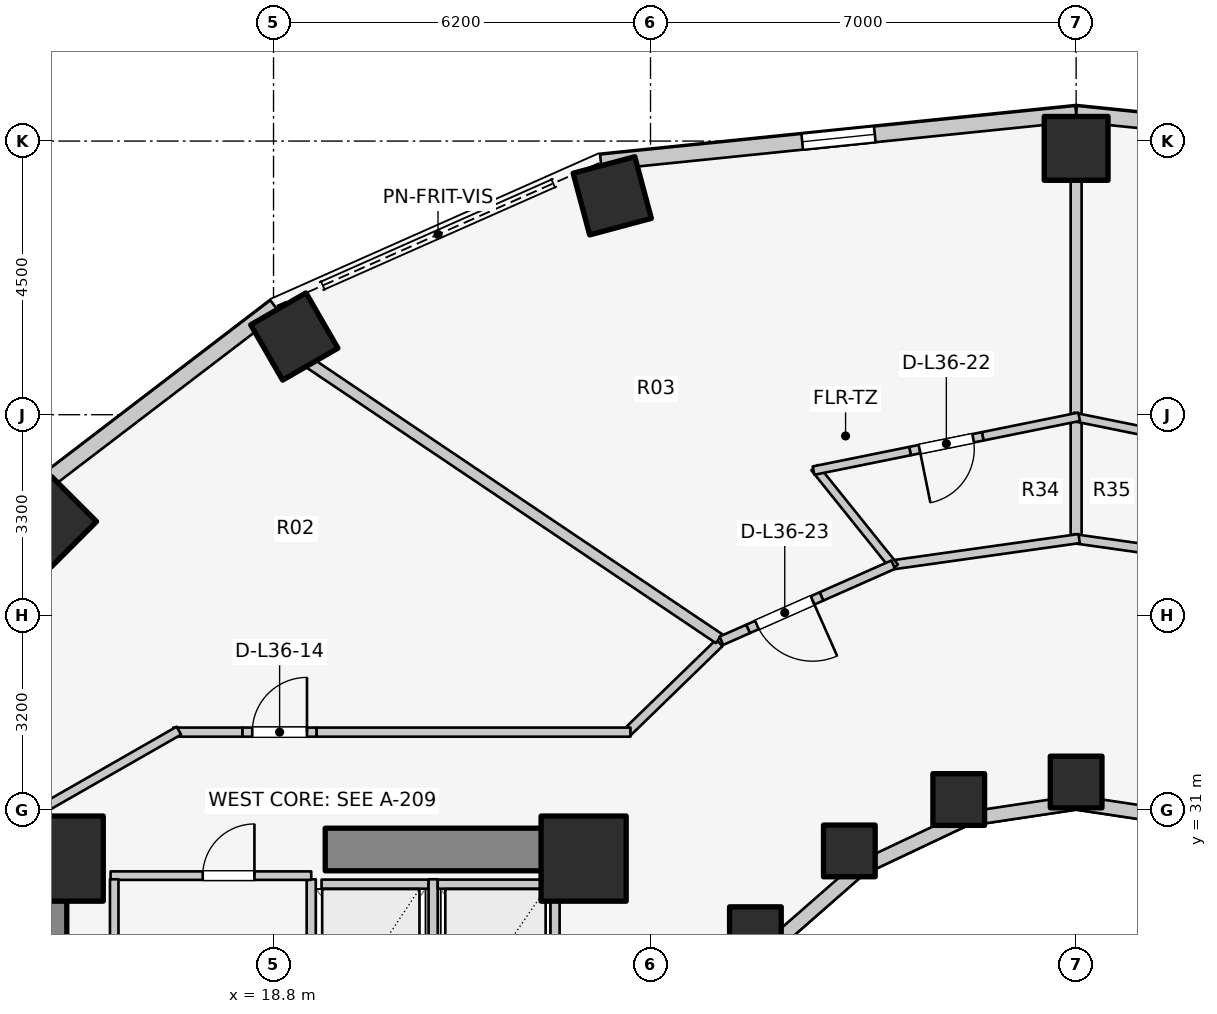
"""IFC4 building model, lengths in metres.
Left out: names, types, materials, properties, quantities, classifications, styles, units other than length and angle.
Written with IfcOpenShell. Run it as: python <this file> out.ifc"""

import sys

from ifc_helpers import new_model, si_unit, direction, frame, frame_2d, origin, origin_2d, place, context, subcontext, project, spatial, rectangle, extrude, element, fill, save


model = new_model("IFC4")
c1 = context("Model", 3, precision=1e-05, world=origin(), true_north=direction((0.0, 1.0)))
c2 = subcontext(c1, "Body", "Model", "MODEL_VIEW")
j1 = project(units=[si_unit("LENGTHUNIT", "METRE"), si_unit("PLANEANGLEUNIT", "RADIAN")], contexts=[c1])
p1 = place(None, origin())
s1 = spatial("IfcSite", under=j1, at=p1, CompositionType="ELEMENT")
p2 = place(p1, origin())
s2 = spatial("IfcBuilding", under=s1, at=p2, CompositionType="ELEMENT")
p3 = place(p2, frame((0.0, 0.0, 119.7)))
s3 = spatial("IfcBuildingStorey", under=s2, at=p3, CompositionType="ELEMENT", Elevation=119.7)
p4 = place(p3, frame((15.05, 17.05, 0.0), z_axis=(0.0, 0.0, 1.0), x_axis=(0.0, 1.0, 0.0)))
e1 = element("IfcWall", 1, at=p4, inside=s3, PredefinedType="SHEAR", context=c2, shape_type="SweptSolid", body=[
    extrude(rectangle(XDim=12.8, YDim=0.7, at=frame_2d((6.4, 0.0))), origin(), (0.0, 0.0, 1.0), 3.1),
])
p5 = place(p3, frame((19.65, 30.35, 0.0), z_axis=(0.0, 0.0, 1.0), x_axis=(1.0, 0.0, 0.0)))
e2 = element("IfcWall", 2, at=p5, inside=s3, PredefinedType="SHEAR", context=c2, shape_type="SweptSolid", body=[
    extrude(rectangle(XDim=4.5, YDim=0.7, at=frame_2d((2.25, 0.0))), origin(), (0.0, 0.0, 1.0), 3.1),
])
for number, where, z_axis, x_axis in (
    (3, (23.9, 30.2, 0.0), (0.0, 0.0, 1.0), (1.0, 0.0, 0.0)),
    (4, (15.3, 30.2, 0.0), (0.0, 0.0, 1.0), (1.0, 0.0, 0.0)),
):
    element("IfcColumn", number, at=place(p3, frame(where, z_axis=z_axis, x_axis=x_axis)), inside=s3, PredefinedType="COLUMN", context=c2, shape_type="SweptSolid", body=[
        extrude(rectangle(XDim=1.4, YDim=1.4, at=origin_2d()), origin(), (0.0, 0.0, 1.0), 3.1),
    ])
p6 = place(p3, frame((32.0, 31.46, 0.0), z_axis=(0.0, 0.0, 1.0), x_axis=(1.0, 0.0, 0.0)))
e5 = element("IfcColumn", 5, at=p6, inside=s3, PredefinedType="COLUMN", context=c2, shape_type="SweptSolid", body=[
    extrude(rectangle(XDim=0.85, YDim=0.85, at=origin_2d()), origin(), (0.0, 0.0, 1.0), 3.1),
])
p7 = place(p3, frame((32.0, 41.88, 0.0), z_axis=(0.0, 0.0, 1.0), x_axis=(0.0, 1.0, 0.0)))
e6 = element("IfcColumn", 6, at=p7, inside=s3, PredefinedType="COLUMN", context=c2, shape_type="SweptSolid", body=[
    extrude(rectangle(XDim=1.05, YDim=1.05, at=origin_2d()), origin(), (0.0, 0.0, 1.0), 3.1),
])
p8 = place(p3, frame((30.069, 31.172, 0.0), z_axis=(0.0, 0.0, 1.0), x_axis=(1.0, 0.0, 0.0)))
e7 = element("IfcColumn", 7, at=p8, inside=s3, PredefinedType="COLUMN", context=c2, shape_type="SweptSolid", body=[
    extrude(rectangle(XDim=0.85, YDim=0.85, at=origin_2d()), origin(), (0.0, 0.0, 1.0), 3.1),
])
p9 = place(p3, frame((24.371, 41.1, 0.0), z_axis=(0.0, 0.0, 1.0), x_axis=(-0.258819045103, 0.965925826289, 0.0)))
e8 = element("IfcColumn", 8, at=p9, inside=s3, PredefinedType="COLUMN", context=c2, shape_type="SweptSolid", body=[
    extrude(rectangle(XDim=1.05, YDim=1.05, at=origin_2d()), origin(), (0.0, 0.0, 1.0), 3.1),
])
p10 = place(p3, frame((28.27, 30.327, 0.0), z_axis=(0.0, 0.0, 1.0), x_axis=(1.0, 0.0, 0.0)))
e9 = element("IfcColumn", 9, at=p10, inside=s3, PredefinedType="COLUMN", context=c2, shape_type="SweptSolid", body=[
    extrude(rectangle(XDim=0.85, YDim=0.85, at=origin_2d()), origin(), (0.0, 0.0, 1.0), 3.1),
])
p11 = place(p3, frame((19.142, 38.786, 0.0), z_axis=(0.0, 0.0, 1.0), x_axis=(-0.5, 0.866025403784, 0.0)))
e10 = element("IfcColumn", 10, at=p11, inside=s3, PredefinedType="COLUMN", context=c2, shape_type="SweptSolid", body=[
    extrude(rectangle(XDim=1.05, YDim=1.05, at=origin_2d()), origin(), (0.0, 0.0, 1.0), 3.1),
])
p12 = place(p3, frame((26.725, 28.982, 0.0), z_axis=(0.0, 0.0, 1.0), x_axis=(1.0, 0.0, 0.0)))
e11 = element("IfcColumn", 11, at=p12, inside=s3, PredefinedType="COLUMN", context=c2, shape_type="SweptSolid", body=[
    extrude(rectangle(XDim=0.85, YDim=0.85, at=origin_2d()), origin(), (0.0, 0.0, 1.0), 3.1),
])
p13 = place(p3, frame((15.147, 35.743, 0.0), z_axis=(0.0, 0.0, 1.0), x_axis=(-0.707106781187, 0.707106781187, 0.0)))
e12 = element("IfcColumn", 12, at=p13, inside=s3, PredefinedType="COLUMN", context=c2, shape_type="SweptSolid", body=[
    extrude(rectangle(XDim=1.05, YDim=1.05, at=origin_2d()), origin(), (0.0, 0.0, 1.0), 3.1),
])
for number, where, z_axis, x_axis in (
    (13, (33.843, 30.843, 0.0), (0.0, 0.0, 1.0), (-0.989, 0.149, 0.0)),
    (14, (32.0, 31.12, 0.0), (0.0, 0.0, 1.0), (-0.989, -0.149, 0.0)),
):
    element("IfcWall", number, at=place(p3, frame(where, z_axis=z_axis, x_axis=x_axis)), inside=s3, PredefinedType="STANDARD", context=c2, shape_type="SweptSolid", body=[
        extrude(rectangle(XDim=1.864, YDim=0.23, at=frame_2d((0.932, 0.0))), origin(), (0.0, 0.0, 1.0), 1.22),
    ])
p14 = place(p3, frame((30.157, 30.843, 0.0), z_axis=(0.0, 0.0, 1.0), x_axis=(-0.904179699603, -0.427152280606, 0.0)))
e15 = element("IfcWall", 15, at=p14, inside=s3, PredefinedType="STANDARD", context=c2, shape_type="SweptSolid", body=[
    extrude(rectangle(XDim=1.899, YDim=0.23, at=frame_2d((0.95, 0.0))), origin(), (0.0, 0.0, 1.0), 1.22),
])
p15 = place(p3, frame((28.44, 30.032, 0.0), z_axis=(0.0, 0.0, 1.0), x_axis=(-0.752576694707, -0.658504607869, 0.0)))
e16 = element("IfcWall", 16, at=p15, inside=s3, PredefinedType="STANDARD", context=c2, shape_type="SweptSolid", body=[
    extrude(rectangle(XDim=1.959, YDim=0.23, at=frame_2d((0.98, 0.0))), origin(), (0.0, 0.0, 1.0), 1.22),
])
p16 = place(p3, frame((39.816, 41.651, 0.0), z_axis=(0.0, 0.0, 1.0), x_axis=(-0.994821390558, 0.101638579726, 0.0)))
e17 = element("IfcWall", 17, at=p16, inside=s3, PredefinedType="STANDARD", context=c2, shape_type="SweptSolid", body=[
    extrude(rectangle(XDim=7.857, YDim=0.26, at=frame_2d((3.929, 0.0))), origin(), (0.0, 0.0, 1.0), 1.22),
])
p17 = place(p16, frame((3.329, 0.0, 0.15)))
e18 = element("IfcOpeningElement", 18, at=p17, cuts=e17, PredefinedType="OPENING", context=c2, shape_type="SweptSolid", body=[
    extrude(rectangle(XDim=1.2, YDim=0.9, at=frame_2d((0.6, 0.45))), frame((0.0, 0.14, 0.0), z_axis=(0.0, -1.0, 0.0), x_axis=(1.0, 0.0, 0.0)), (0.0, 0.0, 1.0), 0.28),
])
p18 = place(p3, frame((32.0, 42.449, 0.0), z_axis=(0.0, 0.0, 1.0), x_axis=(-0.994821390558, -0.101638579726, 0.0)))
e19 = element("IfcWall", 19, at=p18, inside=s3, PredefinedType="STANDARD", context=c2, shape_type="SweptSolid", body=[
    extrude(rectangle(XDim=7.857, YDim=0.26, at=frame_2d((3.929, 0.0))), origin(), (0.0, 0.0, 1.0), 1.22),
])
p19 = place(p18, frame((3.329, 0.0, 0.15)))
e20 = element("IfcOpeningElement", 20, at=p19, cuts=e19, PredefinedType="OPENING", context=c2, shape_type="SweptSolid", body=[
    extrude(rectangle(XDim=1.2, YDim=0.9, at=frame_2d((0.6, 0.45))), frame((0.0, 0.14, 0.0), z_axis=(0.0, -1.0, 0.0), x_axis=(1.0, 0.0, 0.0)), (0.0, 0.0, 1.0), 0.28),
])
p20 = place(p3, frame((18.827, 39.278, 0.0), z_axis=(0.0, 0.0, 1.0), x_axis=(-0.794809810864, -0.606858603427, 0.0)))
e21 = element("IfcWall", 21, at=p20, inside=s3, PredefinedType="STANDARD", context=c2, shape_type="SweptSolid", body=[
    extrude(rectangle(XDim=5.149, YDim=0.26, at=frame_2d((2.575, 0.0))), origin(), (0.0, 0.0, 1.0), 1.22),
])
p21 = place(p3, frame((19.59, 29.78, 0.0), z_axis=(0.0, 0.0, 1.0), x_axis=(1.0, 0.0, 0.0)))
e22 = element("IfcWall", 22, at=p21, inside=s3, PredefinedType="SOLIDWALL", context=c2, shape_type="SweptSolid", body=[
    extrude(rectangle(XDim=1.76, YDim=0.15, at=frame_2d((0.88, 0.0))), origin(), (0.0, 0.0, 1.0), 2.575),
])
for number, where, z_axis, x_axis in (
    (23, (19.42, 27.14, 0.0), (0.0, 0.0, 1.0), (0.0, 1.0, 0.0)),
    (24, (21.425, 27.14, 0.0), (0.0, 0.0, 1.0), (0.0, 1.0, 0.0)),
):
    element("IfcWall", number, at=place(p3, frame(where, z_axis=z_axis, x_axis=x_axis)), inside=s3, PredefinedType="SOLIDWALL", context=c2, shape_type="SweptSolid", body=[
        extrude(rectangle(XDim=2.72, YDim=0.15, at=frame_2d((1.36, 0.0))), origin(), (0.0, 0.0, 1.0), 2.575),
    ])
p22 = place(p3, frame((21.5, 29.78, 0.0), z_axis=(0.0, 0.0, 1.0), x_axis=(1.0, 0.0, 0.0)))
e25 = element("IfcWall", 25, at=p22, inside=s3, PredefinedType="SOLIDWALL", context=c2, shape_type="SweptSolid", body=[
    extrude(rectangle(XDim=1.76, YDim=0.15, at=frame_2d((0.88, 0.0))), origin(), (0.0, 0.0, 1.0), 2.575),
])
p23 = place(p3, frame((23.43, 27.14, 0.0), z_axis=(0.0, 0.0, 1.0), x_axis=(0.0, 1.0, 0.0)))
e26 = element("IfcWall", 26, at=p23, inside=s3, PredefinedType="SOLIDWALL", context=c2, shape_type="SweptSolid", body=[
    extrude(rectangle(XDim=2.72, YDim=0.15, at=frame_2d((1.36, 0.0))), origin(), (0.0, 0.0, 1.0), 2.575),
])
p24 = place(p3, frame((16.12, 29.92, 0.0), z_axis=(0.0, 0.0, 1.0), x_axis=(1.0, 0.0, 0.0)))
e27 = element("IfcWall", 27, at=p24, inside=s3, PredefinedType="PLUMBINGWALL", context=c2, shape_type="SweptSolid", body=[
    extrude(rectangle(XDim=3.3, YDim=0.14, at=frame_2d((1.65, 0.0))), origin(), (0.0, 0.0, 1.0), 2.575),
])
p25 = place(p24, frame((1.516, 0.0, 0.0)))
e28 = element("IfcOpeningElement", 28, at=p25, cuts=e27, PredefinedType="OPENING", context=c2, shape_type="SweptSolid", body=[
    extrude(rectangle(XDim=0.85, YDim=2.05, at=frame_2d((0.425, 1.025))), frame((0.0, 0.08, 0.0), z_axis=(0.0, -1.0, 0.0), x_axis=(1.0, 0.0, 0.0)), (0.0, 0.0, 1.0), 0.16),
])
p26 = place(p3, frame((16.18, 25.98, 0.0), z_axis=(0.0, 0.0, 1.0), x_axis=(0.0, 1.0, 0.0)))
e29 = element("IfcWall", 29, at=p26, inside=s3, PredefinedType="PLUMBINGWALL", context=c2, shape_type="SweptSolid", body=[
    extrude(rectangle(XDim=3.88, YDim=0.14, at=frame_2d((1.94, 0.0))), origin(), (0.0, 0.0, 1.0), 2.575),
])
p27 = place(p3, frame((26.133, 33.749, 0.0), z_axis=(0.0, 0.0, 1.0), x_axis=(-0.717419568599, -0.696641344302, 0.0)))
e30 = element("IfcWall", 30, at=p27, inside=s3, PredefinedType="PARTITIONING", context=c2, shape_type="SweptSolid", body=[
    extrude(rectangle(XDim=2.138, YDim=0.15, at=frame_2d((1.069, 0.0))), origin(), (0.0, 0.0, 1.0), 1.22),
])
p28 = place(p3, frame((17.15, 32.28, 0.0), z_axis=(0.0, 0.0, 1.0), x_axis=(1.0, 0.0, 0.0)))
e31 = element("IfcWall", 31, at=p28, inside=s3, PredefinedType="PARTITIONING", context=c2, shape_type="SweptSolid", body=[
    extrude(rectangle(XDim=1.14, YDim=0.15, at=frame_2d((0.57, 0.0))), origin(), (0.0, 0.0, 1.0), 2.575),
])
p29 = place(p3, frame((18.29, 32.28, 0.0), z_axis=(0.0, 0.0, 1.0), x_axis=(1.0, 0.0, 0.0)))
e32 = element("IfcWall", 32, at=p29, inside=s3, PredefinedType="PARTITIONING", context=c2, shape_type="SweptSolid", body=[
    extrude(rectangle(XDim=1.22, YDim=0.15, at=frame_2d((0.61, 0.0))), origin(), (0.0, 0.0, 1.0), 2.575),
])
p30 = place(p29, frame((0.16, 0.0, 0.0)))
e33 = element("IfcOpeningElement", 33, at=p30, cuts=e32, PredefinedType="OPENING", context=c2, shape_type="SweptSolid", body=[
    extrude(rectangle(XDim=0.9, YDim=2.1, at=frame_2d((0.45, 1.05))), frame((0.0, 0.085, 0.0), z_axis=(0.0, -1.0, 0.0), x_axis=(1.0, 0.0, 0.0)), (0.0, 0.0, 1.0), 0.17),
])
p31 = place(p3, frame((19.51, 32.28, 0.0), z_axis=(0.0, 0.0, 1.0), x_axis=(1.0, 0.0, 0.0)))
e34 = element("IfcWall", 34, at=p31, inside=s3, PredefinedType="PARTITIONING", context=c2, shape_type="SweptSolid", body=[
    extrude(rectangle(XDim=5.16, YDim=0.15, at=frame_2d((2.58, 0.0))), origin(), (0.0, 0.0, 1.0), 1.22),
])
p32 = place(p3, frame((17.243, 32.305, 0.0), z_axis=(0.0, 0.0, 1.0), x_axis=(-0.867991349648, -0.496579315857, 0.0)))
e35 = element("IfcWall", 35, at=p32, inside=s3, PredefinedType="PARTITIONING", context=c2, shape_type="SweptSolid", body=[
    extrude(rectangle(XDim=2.567, YDim=0.15, at=frame_2d((1.283, 0.0))), origin(), (0.0, 0.0, 1.0), 1.22),
])
p33 = place(p3, frame((32.0, 35.511, 0.0), z_axis=(0.0, 0.0, 1.0), x_axis=(0.0, 1.0, 0.0)))
e36 = element("IfcWall", 36, at=p33, inside=s3, PredefinedType="PARTITIONING", context=c2, shape_type="SweptSolid", body=[
    extrude(rectangle(XDim=5.864, YDim=0.18, at=frame_2d((2.932, 0.0))), origin(), (0.0, 0.0, 1.0), 1.22),
])
p34 = place(p3, frame((26.126, 33.818, 0.0), z_axis=(0.0, 0.0, 1.0), x_axis=(-0.829603023521, 0.558353672295, 0.0)))
e37 = element("IfcWall", 37, at=p34, inside=s3, PredefinedType="PARTITIONING", context=c2, shape_type="SweptSolid", body=[
    extrude(rectangle(XDim=8.115, YDim=0.18, at=frame_2d((4.058, 0.0))), origin(), (0.0, 0.0, 1.0), 1.22),
])
p35 = place(p3, frame((35.066, 35.025, 0.0), z_axis=(0.0, 0.0, 1.0), x_axis=(-0.990254405439, 0.139270285808, 0.0)))
e38 = element("IfcWall", 38, at=p35, inside=s3, PredefinedType="PARTITIONING", context=c2, shape_type="SweptSolid", body=[
    extrude(rectangle(XDim=3.147, YDim=0.15, at=frame_2d((1.573, 0.0))), origin(), (0.0, 0.0, 1.0), 1.22),
])
p36 = place(p3, frame((33.537, 37.145, 0.0), z_axis=(0.0, 0.0, 1.0), x_axis=(-0.980084252106, 0.198582120981, 0.0)))
e39 = element("IfcWall", 39, at=p36, inside=s3, PredefinedType="PLUMBINGWALL", context=c2, shape_type="SweptSolid", body=[
    extrude(rectangle(XDim=1.618, YDim=0.14, at=frame_2d((0.809, 0.0))), origin(), (0.0, 0.0, 1.0), 1.22),
])
p37 = place(p3, frame((32.05, 35.463, 0.0), z_axis=(0.0, 0.0, 1.0), x_axis=(-0.990254405439, -0.139270285808, 0.0)))
e40 = element("IfcWall", 40, at=p37, inside=s3, PredefinedType="PARTITIONING", context=c2, shape_type="SweptSolid", body=[
    extrude(rectangle(XDim=3.147, YDim=0.15, at=frame_2d((1.573, 0.0))), origin(), (0.0, 0.0, 1.0), 1.22),
])
p38 = place(p3, frame((29.014, 34.993, 0.0), z_axis=(0.0, 0.0, 1.0), x_axis=(-0.626196812755, 0.779665025313, 0.0)))
e41 = element("IfcWall", 41, at=p38, inside=s3, PredefinedType="PLUMBINGWALL", context=c2, shape_type="SweptSolid", body=[
    extrude(rectangle(XDim=2.1, YDim=0.14, at=frame_2d((1.05, 0.0))), origin(), (0.0, 0.0, 1.0), 2.105),
])
p39 = place(p3, frame((32.049, 37.466, 0.0), z_axis=(0.0, 0.0, 1.0), x_axis=(-0.980090201438, -0.198552756326, 0.0)))
e42 = element("IfcWall", 42, at=p39, inside=s3, PredefinedType="PLUMBINGWALL", context=c2, shape_type="SweptSolid", body=[
    extrude(rectangle(XDim=1.618, YDim=0.14, at=frame_2d((0.809, 0.0))), origin(), (0.0, 0.0, 1.0), 1.22),
])
p40 = place(p3, frame((30.463, 37.145, 0.0), z_axis=(0.0, 0.0, 1.0), x_axis=(-0.980092719514, -0.198540326273, 0.0)))
e43 = element("IfcWall", 43, at=p40, inside=s3, PredefinedType="PLUMBINGWALL", context=c2, shape_type="SweptSolid", body=[
    extrude(rectangle(XDim=1.22, YDim=0.14, at=frame_2d((0.61, 0.0))), origin(), (0.0, 0.0, 1.0), 2.575),
])
p41 = place(p40, frame((0.16, 0.0, 0.0)))
e44 = element("IfcOpeningElement", 44, at=p41, cuts=e43, PredefinedType="OPENING", context=c2, shape_type="SweptSolid", body=[
    extrude(rectangle(XDim=0.9, YDim=2.1, at=frame_2d((0.45, 1.05))), frame((0.0, 0.08, 0.0), z_axis=(0.0, -1.0, 0.0), x_axis=(1.0, 0.0, 0.0)), (0.0, 0.0, 1.0), 0.16),
])
p42 = place(p3, frame((29.268, 36.902, 0.0), z_axis=(0.0, 0.0, 1.0), x_axis=(-0.980084252106, -0.198582120981, 0.0)))
e45 = element("IfcWall", 45, at=p42, inside=s3, PredefinedType="PLUMBINGWALL", context=c2, shape_type="SweptSolid", body=[
    extrude(rectangle(XDim=1.618, YDim=0.14, at=frame_2d((0.809, 0.0))), origin(), (0.0, 0.0, 1.0), 2.575),
])
p43 = place(p3, frame((28.991, 35.034, 0.0), z_axis=(0.0, 0.0, 1.0), x_axis=(-0.914512451665, -0.404557753292, 0.0)))
e46 = element("IfcWall", 46, at=p43, inside=s3, PredefinedType="PARTITIONING", context=c2, shape_type="SweptSolid", body=[
    extrude(rectangle(XDim=1.29, YDim=0.15, at=frame_2d((0.645, 0.0))), origin(), (0.0, 0.0, 1.0), 1.22),
])
p44 = place(p3, frame((27.811, 34.512, 0.0), z_axis=(0.0, 0.0, 1.0), x_axis=(-0.914352324799, -0.404919530444, 0.0)))
e47 = element("IfcWall", 47, at=p44, inside=s3, PredefinedType="PARTITIONING", context=c2, shape_type="SweptSolid", body=[
    extrude(rectangle(XDim=1.32, YDim=0.15, at=frame_2d((0.66, 0.0))), origin(), (0.0, 0.0, 1.0), 2.16),
])
p45 = place(p44, frame((0.16, 0.0, 0.0)))
e48 = element("IfcOpeningElement", 48, at=p45, cuts=e47, PredefinedType="OPENING", context=c2, shape_type="SweptSolid", body=[
    extrude(rectangle(XDim=1.0, YDim=2.1, at=frame_2d((0.5, 1.05))), frame((0.0, 0.085, 0.0), z_axis=(0.0, -1.0, 0.0), x_axis=(1.0, 0.0, 0.0)), (0.0, 0.0, 1.0), 0.17),
])
p46 = place(p3, frame((26.604, 33.977, 0.0), z_axis=(0.0, 0.0, 1.0), x_axis=(-0.914564252461, -0.404440636088, 0.0)))
e49 = element("IfcWall", 49, at=p46, inside=s3, PredefinedType="PARTITIONING", context=c2, shape_type="SweptSolid", body=[
    extrude(rectangle(XDim=0.48, YDim=0.15, at=frame_2d((0.24, 0.0))), origin(), (0.0, 0.0, 1.0), 2.575),
])
p47 = place(p19, origin())
e50 = element("IfcWindow", 50, at=p47, inside=s3, PartitioningType="SINGLE_PANEL", PredefinedType="WINDOW", context=c2, shape_type="SweptSolid", body=[
    extrude(rectangle(XDim=1.2, YDim=0.9, at=frame_2d((0.6, 0.45))), frame((0.0, 0.03, 0.0), z_axis=(0.0, -1.0, 0.0), x_axis=(1.0, 0.0, 0.0)), (0.0, 0.0, 1.0), 0.06),
])
fill(e20, e50)
p48 = place(p25, origin())
e51 = element("IfcDoor", 51, at=p48, inside=s3, OperationType="SINGLE_SWING_RIGHT", PredefinedType="DOOR", context=c2, shape_type="SweptSolid", body=[
    extrude(rectangle(XDim=0.85, YDim=2.05, at=frame_2d((0.425, 1.025))), frame((0.0, 0.025, 0.0), z_axis=(0.0, -1.0, 0.0), x_axis=(1.0, 0.0, 0.0)), (0.0, 0.0, 1.0), 0.05),
])
fill(e28, e51)
p49 = place(p30, origin())
e52 = element("IfcDoor", 52, at=p49, inside=s3, OperationType="SINGLE_SWING_RIGHT", PredefinedType="DOOR", context=c2, shape_type="SweptSolid", body=[
    extrude(rectangle(XDim=0.9, YDim=2.1, at=frame_2d((0.45, 1.05))), frame((0.0, 0.025, 0.0), z_axis=(0.0, -1.0, 0.0), x_axis=(1.0, 0.0, 0.0)), (0.0, 0.0, 1.0), 0.05),
])
fill(e33, e52)
p50 = place(p41, origin())
e53 = element("IfcDoor", 53, at=p50, inside=s3, OperationType="SINGLE_SWING_RIGHT", PredefinedType="DOOR", context=c2, shape_type="SweptSolid", body=[
    extrude(rectangle(XDim=0.9, YDim=2.1, at=frame_2d((0.45, 1.05))), frame((0.0, 0.025, 0.0), z_axis=(0.0, -1.0, 0.0), x_axis=(1.0, 0.0, 0.0)), (0.0, 0.0, 1.0), 0.05),
])
fill(e44, e53)
p51 = place(p45, origin())
e54 = element("IfcDoor", 54, at=p51, inside=s3, OperationType="SINGLE_SWING_LEFT", PredefinedType="DOOR", context=c2, shape_type="SweptSolid", body=[
    extrude(rectangle(XDim=1.0, YDim=2.1, at=frame_2d((0.5, 1.05))), frame((0.0, 0.025, 0.0), z_axis=(0.0, -1.0, 0.0), x_axis=(1.0, 0.0, 0.0)), (0.0, 0.0, 1.0), 0.05),
])
fill(e48, e54)
save(model, sys.argv[1])
